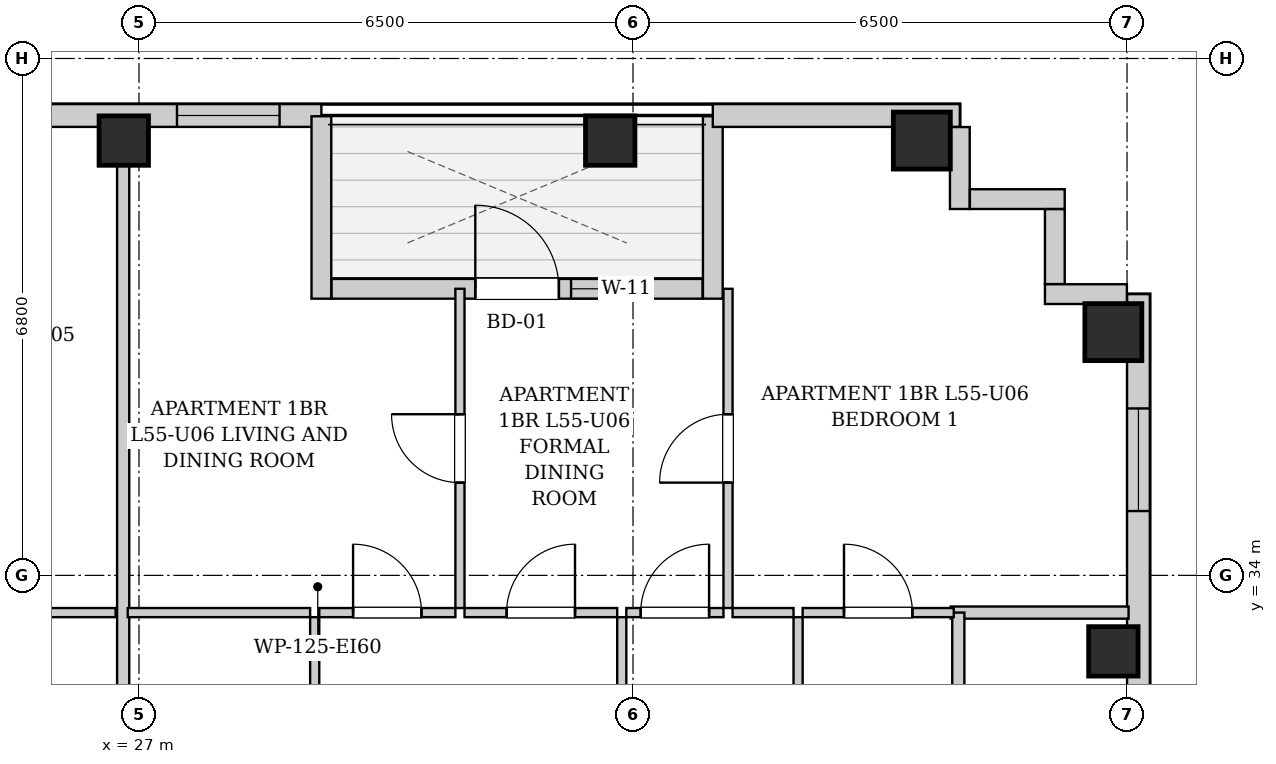
"""IFC4 building model, lengths in metres.
Left out: names, types, materials, properties, quantities, classifications, styles, units other than length and angle.
Written with IfcOpenShell. Run it as: python <this file> out.ifc"""

import sys

from ifc_helpers import new_model, si_unit, direction, frame, frame_2d, origin, origin_2d, place, context, subcontext, project, spatial, rectangle, extrude, element, fill, save


model = new_model("IFC4")
c1 = context("Model", 3, precision=1e-05, world=origin(), true_north=direction((0.0, 1.0)))
c2 = subcontext(c1, "Body", "Model", "MODEL_VIEW")
j1 = project(units=[si_unit("LENGTHUNIT", "METRE"), si_unit("PLANEANGLEUNIT", "RADIAN")], contexts=[c1])
p1 = place(None, origin())
s1 = spatial("IfcSite", under=j1, at=p1, CompositionType="ELEMENT")
p2 = place(p1, origin())
s2 = spatial("IfcBuilding", under=s1, at=p2, CompositionType="ELEMENT")
p3 = place(p2, frame((0.0, 0.0, 190.9)))
s3 = spatial("IfcBuildingStorey", under=s2, at=p3, CompositionType="ELEMENT", Elevation=190.9)
for number, where, z_axis, x_axis in (
    (1, (26.8, 39.72, 0.0), (0.0, 0.0, 1.0), (1.0, 0.0, 0.0)),
    (2, (33.2, 39.72, 0.0), (0.0, 0.0, 1.0), (1.0, 0.0, 0.0)),
):
    element("IfcColumn", number, at=place(p3, frame(where, z_axis=z_axis, x_axis=x_axis)), inside=s3, PredefinedType="COLUMN", context=c2, shape_type="SweptSolid", body=[
        extrude(rectangle(XDim=0.65, YDim=0.65, at=origin_2d()), origin(), (0.0, 0.0, 1.0), 3.3),
    ])
p4 = place(p3, frame((37.3, 39.72, 0.0), z_axis=(0.0, 0.0, 1.0), x_axis=(1.0, 0.0, 0.0)))
e3 = element("IfcColumn", 3, at=p4, inside=s3, PredefinedType="COLUMN", context=c2, shape_type="SweptSolid", body=[
    extrude(rectangle(XDim=0.75, YDim=0.75, at=origin_2d()), origin(), (0.0, 0.0, 1.0), 3.3),
])
p5 = place(p3, frame((39.82, 33.0, 0.0), z_axis=(0.0, 0.0, 1.0), x_axis=(1.0, 0.0, 0.0)))
e4 = element("IfcColumn", 4, at=p5, inside=s3, PredefinedType="COLUMN", context=c2, shape_type="SweptSolid", body=[
    extrude(rectangle(XDim=0.65, YDim=0.65, at=origin_2d()), origin(), (0.0, 0.0, 1.0), 3.3),
])
p6 = place(p3, frame((39.82, 37.2, 0.0), z_axis=(0.0, 0.0, 1.0), x_axis=(1.0, 0.0, 0.0)))
e5 = element("IfcColumn", 5, at=p6, inside=s3, PredefinedType="COLUMN", context=c2, shape_type="SweptSolid", body=[
    extrude(rectangle(XDim=0.75, YDim=0.75, at=origin_2d()), origin(), (0.0, 0.0, 1.0), 3.3),
])
p7 = place(p3, frame((19.7, 40.05, 0.0), z_axis=(0.0, 0.0, 1.0), x_axis=(1.0, 0.0, 0.0)))
e6 = element("IfcWall", 6, at=p7, inside=s3, PredefinedType="SOLIDWALL", context=c2, shape_type="SweptSolid", body=[
    extrude(rectangle(XDim=9.7, YDim=0.3, at=frame_2d((4.85, 0.0))), origin(), (0.0, 0.0, 1.0), 3.04),
])
p8 = place(p7, frame((2.12, 0.0, 0.55)))
e7 = element("IfcOpeningElement", 7, at=p8, cuts=e6, PredefinedType="OPENING", context=c2, shape_type="SweptSolid", body=[
    extrude(rectangle(XDim=0.68, YDim=1.2, at=frame_2d((0.34, 0.6))), frame((0.0, 0.16, 0.0), z_axis=(0.0, -1.0, 0.0), x_axis=(1.0, 0.0, 0.0)), (0.0, 0.0, 1.0), 0.32),
])
p9 = place(p7, frame((7.8, 0.0, 0.55)))
e8 = element("IfcOpeningElement", 8, at=p9, cuts=e6, PredefinedType="OPENING", context=c2, shape_type="SweptSolid", body=[
    extrude(rectangle(XDim=1.35, YDim=1.2, at=frame_2d((0.675, 0.6))), frame((0.0, 0.16, 0.0), z_axis=(0.0, -1.0, 0.0), x_axis=(1.0, 0.0, 0.0)), (0.0, 0.0, 1.0), 0.32),
])
p10 = place(p3, frame((29.4, 40.04, 0.0), z_axis=(0.0, 0.0, 1.0), x_axis=(0.0, -1.0, 0.0)))
e9 = element("IfcWall", 9, at=p10, inside=s3, PredefinedType="SOLIDWALL", context=c2, shape_type="SweptSolid", body=[
    extrude(rectangle(XDim=2.4, YDim=0.26, at=frame_2d((1.2, 0.0))), origin(), (0.0, 0.0, 1.0), 3.04),
])
p11 = place(p3, frame((29.534, 37.77, 0.0), z_axis=(0.0, 0.0, 1.0), x_axis=(1.0, 0.0, 0.0)))
e10 = element("IfcWall", 10, at=p11, inside=s3, PredefinedType="SOLIDWALL", context=c2, shape_type="SweptSolid", body=[
    extrude(rectangle(XDim=4.882, YDim=0.26, at=frame_2d((2.441, 0.0))), origin(), (0.0, 0.0, 1.0), 3.04),
])
p12 = place(p11, frame((1.891, 0.0, 0.0)))
e11 = element("IfcOpeningElement", 11, at=p12, cuts=e10, PredefinedType="OPENING", context=c2, shape_type="SweptSolid", body=[
    extrude(rectangle(XDim=1.1, YDim=2.0, at=frame_2d((0.55, 1.0))), frame((0.0, 0.14, 0.0), z_axis=(0.0, -1.0, 0.0), x_axis=(1.0, 0.0, 0.0)), (0.0, 0.0, 1.0), 0.28),
])
p13 = place(p11, frame((3.151, 0.0, 0.55)))
e12 = element("IfcOpeningElement", 12, at=p13, cuts=e10, PredefinedType="OPENING", context=c2, shape_type="SweptSolid", body=[
    extrude(rectangle(XDim=0.85, YDim=1.2, at=frame_2d((0.425, 0.6))), frame((0.0, 0.14, 0.0), z_axis=(0.0, -1.0, 0.0), x_axis=(1.0, 0.0, 0.0)), (0.0, 0.0, 1.0), 0.28),
])
p14 = place(p3, frame((34.55, 37.64, 0.0), z_axis=(0.0, 0.0, 1.0), x_axis=(0.0, 1.0, 0.0)))
e13 = element("IfcWall", 13, at=p14, inside=s3, PredefinedType="SOLIDWALL", context=c2, shape_type="SweptSolid", body=[
    extrude(rectangle(XDim=2.4, YDim=0.26, at=frame_2d((1.2, 0.0))), origin(), (0.0, 0.0, 1.0), 3.04),
])
p15 = place(p3, frame((34.55, 40.05, 0.0), z_axis=(0.0, 0.0, 1.0), x_axis=(1.0, 0.0, 0.0)))
e14 = element("IfcWall", 14, at=p15, inside=s3, PredefinedType="SOLIDWALL", context=c2, shape_type="SweptSolid", body=[
    extrude(rectangle(XDim=3.25, YDim=0.3, at=frame_2d((1.625, 0.0))), origin(), (0.0, 0.0, 1.0), 3.04),
])
p16 = place(p3, frame((40.15, 37.7, 0.0), z_axis=(0.0, 0.0, 1.0), x_axis=(0.0, -1.0, 0.0)))
e15 = element("IfcWall", 15, at=p16, inside=s3, PredefinedType="SOLIDWALL", context=c2, shape_type="SweptSolid", body=[
    extrude(rectangle(XDim=31.4, YDim=0.3, at=frame_2d((15.7, 0.0))), origin(), (0.0, 0.0, 1.0), 3.04),
])
p17 = place(p16, frame((1.504, 0.0, 0.55)))
e16 = element("IfcOpeningElement", 16, at=p17, cuts=e15, PredefinedType="OPENING", context=c2, shape_type="SweptSolid", body=[
    extrude(rectangle(XDim=1.35, YDim=1.2, at=frame_2d((0.675, 0.6))), frame((0.0, 0.16, 0.0), z_axis=(0.0, -1.0, 0.0), x_axis=(1.0, 0.0, 0.0)), (0.0, 0.0, 1.0), 0.32),
])
p18 = place(p16, frame((18.2, 0.0, 0.55)))
e17 = element("IfcOpeningElement", 17, at=p18, cuts=e15, PredefinedType="OPENING", context=c2, shape_type="SweptSolid", body=[
    extrude(rectangle(XDim=1.35, YDim=1.2, at=frame_2d((0.675, 0.6))), frame((0.0, 0.16, 0.0), z_axis=(0.0, -1.0, 0.0), x_axis=(1.0, 0.0, 0.0)), (0.0, 0.0, 1.0), 0.32),
])
p19 = place(p16, frame((19.81, 0.0, 0.55)))
e18 = element("IfcOpeningElement", 18, at=p19, cuts=e15, PredefinedType="OPENING", context=c2, shape_type="SweptSolid", body=[
    extrude(rectangle(XDim=1.35, YDim=1.2, at=frame_2d((0.675, 0.6))), frame((0.0, 0.16, 0.0), z_axis=(0.0, -1.0, 0.0), x_axis=(1.0, 0.0, 0.0)), (0.0, 0.0, 1.0), 0.32),
])
p20 = place(p16, frame((11.043, 0.0, 0.55)))
e19 = element("IfcOpeningElement", 19, at=p20, cuts=e15, PredefinedType="OPENING", context=c2, shape_type="SweptSolid", body=[
    extrude(rectangle(XDim=1.35, YDim=1.2, at=frame_2d((0.675, 0.6))), frame((0.0, 0.16, 0.0), z_axis=(0.0, -1.0, 0.0), x_axis=(1.0, 0.0, 0.0)), (0.0, 0.0, 1.0), 0.32),
])
p21 = place(p16, frame((9.185, 0.0, 0.55)))
e20 = element("IfcOpeningElement", 20, at=p21, cuts=e15, PredefinedType="OPENING", context=c2, shape_type="SweptSolid", body=[
    extrude(rectangle(XDim=1.35, YDim=1.2, at=frame_2d((0.675, 0.6))), frame((0.0, 0.16, 0.0), z_axis=(0.0, -1.0, 0.0), x_axis=(1.0, 0.0, 0.0)), (0.0, 0.0, 1.0), 0.32),
])
p22 = place(p3, frame((37.8, 39.898, 0.0), z_axis=(0.0, 0.0, 1.0), x_axis=(0.0, -1.0, 0.0)))
e21 = element("IfcWall", 21, at=p22, inside=s3, PredefinedType="SOLIDWALL", context=c2, shape_type="SweptSolid", body=[
    extrude(rectangle(XDim=1.078, YDim=0.26, at=frame_2d((0.539, 0.0))), origin(), (0.0, 0.0, 1.0), 3.04),
])
p23 = place(p3, frame((37.932, 38.95, 0.0), z_axis=(0.0, 0.0, 1.0), x_axis=(1.0, 0.0, 0.0)))
e22 = element("IfcWall", 22, at=p23, inside=s3, PredefinedType="SOLIDWALL", context=c2, shape_type="SweptSolid", body=[
    extrude(rectangle(XDim=1.248, YDim=0.26, at=frame_2d((0.624, 0.0))), origin(), (0.0, 0.0, 1.0), 3.04),
])
p24 = place(p3, frame((39.05, 38.818, 0.0), z_axis=(0.0, 0.0, 1.0), x_axis=(0.0, -1.0, 0.0)))
e23 = element("IfcWall", 23, at=p24, inside=s3, PredefinedType="SOLIDWALL", context=c2, shape_type="SweptSolid", body=[
    extrude(rectangle(XDim=0.986, YDim=0.26, at=frame_2d((0.493, 0.0))), origin(), (0.0, 0.0, 1.0), 3.04),
])
p25 = place(p3, frame((38.92, 37.7, 0.0), z_axis=(0.0, 0.0, 1.0), x_axis=(1.0, 0.0, 0.0)))
e24 = element("IfcWall", 24, at=p25, inside=s3, PredefinedType="SOLIDWALL", context=c2, shape_type="SweptSolid", body=[
    extrude(rectangle(XDim=1.078, YDim=0.26, at=frame_2d((0.539, 0.0))), origin(), (0.0, 0.0, 1.0), 3.04),
])
p26 = place(p3, frame((23.535, 33.51, 0.0), z_axis=(0.0, 0.0, 1.0), x_axis=(1.0, 0.0, 0.0)))
e25 = element("IfcWall", 25, at=p26, inside=s3, PredefinedType="PARTITIONING", context=c2, shape_type="SweptSolid", body=[
    extrude(rectangle(XDim=3.157, YDim=0.12, at=frame_2d((1.579, 0.0))), origin(), (0.0, 0.0, 1.0), 3.04),
])
p27 = place(p26, frame((1.129, 0.0, 0.0)))
e26 = element("IfcOpeningElement", 26, at=p27, cuts=e25, PredefinedType="OPENING", context=c2, shape_type="SweptSolid", body=[
    extrude(rectangle(XDim=0.9, YDim=2.05, at=frame_2d((0.45, 1.025))), frame((0.0, 0.07, 0.0), z_axis=(0.0, -1.0, 0.0), x_axis=(1.0, 0.0, 0.0)), (0.0, 0.0, 1.0), 0.14),
])
p28 = place(p3, frame((37.68, 33.51, 0.0), z_axis=(0.0, 0.0, 1.0), x_axis=(1.0, 0.0, 0.0)))
e27 = element("IfcWall", 27, at=p28, inside=s3, PredefinedType="PARTITIONING", context=c2, shape_type="SweptSolid", body=[
    extrude(rectangle(XDim=2.34, YDim=0.16, at=frame_2d((1.17, 0.0))), origin(), (0.0, 0.0, 1.0), 3.04),
])
p29 = place(p3, frame((37.78, 30.6, 0.0), z_axis=(0.0, 0.0, 1.0), x_axis=(0.0, 1.0, 0.0)))
e28 = element("IfcWall", 28, at=p29, inside=s3, PredefinedType="PARTITIONING", context=c2, shape_type="SweptSolid", body=[
    extrude(rectangle(XDim=2.91, YDim=0.16, at=frame_2d((1.455, 0.0))), origin(), (0.0, 0.0, 1.0), 3.04),
])
p30 = place(p3, frame((26.792, 30.6, 0.0), z_axis=(0.0, 0.0, 1.0), x_axis=(0.0, 1.0, 0.0)))
e29 = element("IfcWall", 29, at=p30, inside=s3, PredefinedType="PARTITIONING", context=c2, shape_type="SweptSolid", body=[
    extrude(rectangle(XDim=9.32, YDim=0.16, at=frame_2d((4.66, 0.0))), origin(), (0.0, 0.0, 1.0), 3.04),
])
p31 = place(p3, frame((29.312, 30.6, 0.0), z_axis=(0.0, 0.0, 1.0), x_axis=(0.0, 1.0, 0.0)))
e30 = element("IfcWall", 30, at=p31, inside=s3, PredefinedType="PARTITIONING", context=c2, shape_type="SweptSolid", body=[
    extrude(rectangle(XDim=2.85, YDim=0.12, at=frame_2d((1.425, 0.0))), origin(), (0.0, 0.0, 1.0), 3.04),
])
p32 = place(p31, frame((0.995, 0.0, 0.0)))
e31 = element("IfcOpeningElement", 31, at=p32, cuts=e30, PredefinedType="OPENING", context=c2, shape_type="SweptSolid", body=[
    extrude(rectangle(XDim=0.86, YDim=2.05, at=frame_2d((0.43, 1.025))), frame((0.0, 0.07, 0.0), z_axis=(0.0, -1.0, 0.0), x_axis=(1.0, 0.0, 0.0)), (0.0, 0.0, 1.0), 0.14),
])
p33 = place(p3, frame((26.852, 33.51, 0.0), z_axis=(0.0, 0.0, 1.0), x_axis=(1.0, 0.0, 0.0)))
e32 = element("IfcWall", 32, at=p33, inside=s3, PredefinedType="PARTITIONING", context=c2, shape_type="SweptSolid", body=[
    extrude(rectangle(XDim=2.4, YDim=0.12, at=frame_2d((1.2, 0.0))), origin(), (0.0, 0.0, 1.0), 3.04),
])
p34 = place(p3, frame((33.352, 30.6, 0.0), z_axis=(0.0, 0.0, 1.0), x_axis=(0.0, 1.0, 0.0)))
e33 = element("IfcWall", 33, at=p34, inside=s3, PredefinedType="PARTITIONING", context=c2, shape_type="SweptSolid", body=[
    extrude(rectangle(XDim=2.85, YDim=0.12, at=frame_2d((1.425, 0.0))), origin(), (0.0, 0.0, 1.0), 3.04),
])
p35 = place(p34, frame((0.975, 0.0, 0.0)))
e34 = element("IfcOpeningElement", 34, at=p35, cuts=e33, PredefinedType="OPENING", context=c2, shape_type="SweptSolid", body=[
    extrude(rectangle(XDim=0.9, YDim=2.05, at=frame_2d((0.45, 1.025))), frame((0.0, 0.07, 0.0), z_axis=(0.0, -1.0, 0.0), x_axis=(1.0, 0.0, 0.0)), (0.0, 0.0, 1.0), 0.14),
])
p36 = place(p3, frame((29.372, 33.51, 0.0), z_axis=(0.0, 0.0, 1.0), x_axis=(1.0, 0.0, 0.0)))
e35 = element("IfcWall", 35, at=p36, inside=s3, PredefinedType="PARTITIONING", context=c2, shape_type="SweptSolid", body=[
    extrude(rectangle(XDim=1.791, YDim=0.12, at=frame_2d((0.896, 0.0))), origin(), (0.0, 0.0, 1.0), 3.04),
])
p37 = place(p36, frame((0.445, 0.0, 0.0)))
e36 = element("IfcOpeningElement", 36, at=p37, cuts=e35, PredefinedType="OPENING", context=c2, shape_type="SweptSolid", body=[
    extrude(rectangle(XDim=0.9, YDim=2.05, at=frame_2d((0.45, 1.025))), frame((0.0, 0.07, 0.0), z_axis=(0.0, -1.0, 0.0), x_axis=(1.0, 0.0, 0.0)), (0.0, 0.0, 1.0), 0.14),
])
p38 = place(p3, frame((31.283, 33.51, 0.0), z_axis=(0.0, 0.0, 1.0), x_axis=(1.0, 0.0, 0.0)))
e37 = element("IfcWall", 37, at=p38, inside=s3, PredefinedType="PARTITIONING", context=c2, shape_type="SweptSolid", body=[
    extrude(rectangle(XDim=2.009, YDim=0.12, at=frame_2d((1.004, 0.0))), origin(), (0.0, 0.0, 1.0), 3.04),
])
p39 = place(p38, frame((0.554, 0.0, 0.0)))
e38 = element("IfcOpeningElement", 38, at=p39, cuts=e37, PredefinedType="OPENING", context=c2, shape_type="SweptSolid", body=[
    extrude(rectangle(XDim=0.9, YDim=2.05, at=frame_2d((0.45, 1.025))), frame((0.0, 0.07, 0.0), z_axis=(0.0, -1.0, 0.0), x_axis=(1.0, 0.0, 0.0)), (0.0, 0.0, 1.0), 0.14),
])
p40 = place(p3, frame((35.672, 30.6, 0.0), z_axis=(0.0, 0.0, 1.0), x_axis=(0.0, 1.0, 0.0)))
e39 = element("IfcWall", 39, at=p40, inside=s3, PredefinedType="PARTITIONING", context=c2, shape_type="SweptSolid", body=[
    extrude(rectangle(XDim=2.85, YDim=0.12, at=frame_2d((1.425, 0.0))), origin(), (0.0, 0.0, 1.0), 3.04),
])
p41 = place(p40, frame((0.975, 0.0, 0.0)))
e40 = element("IfcOpeningElement", 40, at=p41, cuts=e39, PredefinedType="OPENING", context=c2, shape_type="SweptSolid", body=[
    extrude(rectangle(XDim=0.9, YDim=2.05, at=frame_2d((0.45, 1.025))), frame((0.0, 0.07, 0.0), z_axis=(0.0, -1.0, 0.0), x_axis=(1.0, 0.0, 0.0)), (0.0, 0.0, 1.0), 0.14),
])
p42 = place(p3, frame((33.412, 33.51, 0.0), z_axis=(0.0, 0.0, 1.0), x_axis=(1.0, 0.0, 0.0)))
e41 = element("IfcWall", 41, at=p42, inside=s3, PredefinedType="PARTITIONING", context=c2, shape_type="SweptSolid", body=[
    extrude(rectangle(XDim=1.278, YDim=0.12, at=frame_2d((0.639, 0.0))), origin(), (0.0, 0.0, 1.0), 3.04),
])
p43 = place(p42, frame((0.189, 0.0, 0.0)))
e42 = element("IfcOpeningElement", 42, at=p43, cuts=e41, PredefinedType="OPENING", context=c2, shape_type="SweptSolid", body=[
    extrude(rectangle(XDim=0.9, YDim=2.05, at=frame_2d((0.45, 1.025))), frame((0.0, 0.07, 0.0), z_axis=(0.0, -1.0, 0.0), x_axis=(1.0, 0.0, 0.0)), (0.0, 0.0, 1.0), 0.14),
])
p44 = place(p3, frame((34.81, 33.51, 0.0), z_axis=(0.0, 0.0, 1.0), x_axis=(1.0, 0.0, 0.0)))
e43 = element("IfcWall", 43, at=p44, inside=s3, PredefinedType="PARTITIONING", context=c2, shape_type="SweptSolid", body=[
    extrude(rectangle(XDim=0.802, YDim=0.12, at=frame_2d((0.401, 0.0))), origin(), (0.0, 0.0, 1.0), 3.04),
])
p45 = place(p3, frame((35.732, 33.51, 0.0), z_axis=(0.0, 0.0, 1.0), x_axis=(1.0, 0.0, 0.0)))
e44 = element("IfcWall", 44, at=p45, inside=s3, PredefinedType="PARTITIONING", context=c2, shape_type="SweptSolid", body=[
    extrude(rectangle(XDim=1.988, YDim=0.12, at=frame_2d((0.994, 0.0))), origin(), (0.0, 0.0, 1.0), 3.04),
])
p46 = place(p45, frame((0.544, 0.0, 0.0)))
e45 = element("IfcOpeningElement", 45, at=p46, cuts=e44, PredefinedType="OPENING", context=c2, shape_type="SweptSolid", body=[
    extrude(rectangle(XDim=0.9, YDim=2.05, at=frame_2d((0.45, 1.025))), frame((0.0, 0.07, 0.0), z_axis=(0.0, -1.0, 0.0), x_axis=(1.0, 0.0, 0.0)), (0.0, 0.0, 1.0), 0.14),
])
p47 = place(p3, frame((31.223, 33.57, 0.0), z_axis=(0.0, 0.0, 1.0), x_axis=(0.0, 1.0, 0.0)))
e46 = element("IfcWall", 46, at=p47, inside=s3, PredefinedType="PARTITIONING", context=c2, shape_type="SweptSolid", body=[
    extrude(rectangle(XDim=4.2, YDim=0.12, at=frame_2d((2.1, 0.0))), origin(), (0.0, 0.0, 1.0), 3.04),
])
p48 = place(p47, frame((1.65, 0.0, 0.0)))
e47 = element("IfcOpeningElement", 47, at=p48, cuts=e46, PredefinedType="OPENING", context=c2, shape_type="SweptSolid", body=[
    extrude(rectangle(XDim=0.9, YDim=2.05, at=frame_2d((0.45, 1.025))), frame((0.0, 0.07, 0.0), z_axis=(0.0, -1.0, 0.0), x_axis=(1.0, 0.0, 0.0)), (0.0, 0.0, 1.0), 0.14),
])
p49 = place(p3, frame((34.75, 33.57, 0.0), z_axis=(0.0, 0.0, 1.0), x_axis=(0.0, 1.0, 0.0)))
e48 = element("IfcWall", 48, at=p49, inside=s3, PredefinedType="PARTITIONING", context=c2, shape_type="SweptSolid", body=[
    extrude(rectangle(XDim=4.2, YDim=0.12, at=frame_2d((2.1, 0.0))), origin(), (0.0, 0.0, 1.0), 3.04),
])
p50 = place(p49, frame((1.65, 0.0, 0.0)))
e49 = element("IfcOpeningElement", 49, at=p50, cuts=e48, PredefinedType="OPENING", context=c2, shape_type="SweptSolid", body=[
    extrude(rectangle(XDim=0.9, YDim=2.05, at=frame_2d((0.45, 1.025))), frame((0.0, 0.07, 0.0), z_axis=(0.0, -1.0, 0.0), x_axis=(1.0, 0.0, 0.0)), (0.0, 0.0, 1.0), 0.14),
])
p51 = place(p37, origin())
e50 = element("IfcDoor", 50, at=p51, inside=s3, OperationType="SINGLE_SWING_LEFT", PredefinedType="DOOR", context=c2, shape_type="SweptSolid", body=[
    extrude(rectangle(XDim=0.9, YDim=2.05, at=frame_2d((0.45, 1.025))), frame((0.0, 0.025, 0.0), z_axis=(0.0, -1.0, 0.0), x_axis=(1.0, 0.0, 0.0)), (0.0, 0.0, 1.0), 0.05),
])
fill(e36, e50)
p52 = place(p39, origin())
e51 = element("IfcDoor", 51, at=p52, inside=s3, OperationType="SINGLE_SWING_RIGHT", PredefinedType="DOOR", context=c2, shape_type="SweptSolid", body=[
    extrude(rectangle(XDim=0.9, YDim=2.05, at=frame_2d((0.45, 1.025))), frame((0.0, 0.025, 0.0), z_axis=(0.0, -1.0, 0.0), x_axis=(1.0, 0.0, 0.0)), (0.0, 0.0, 1.0), 0.05),
])
fill(e38, e51)
p53 = place(p43, origin())
e52 = element("IfcDoor", 52, at=p53, inside=s3, OperationType="SINGLE_SWING_RIGHT", PredefinedType="DOOR", context=c2, shape_type="SweptSolid", body=[
    extrude(rectangle(XDim=0.9, YDim=2.05, at=frame_2d((0.45, 1.025))), frame((0.0, 0.025, 0.0), z_axis=(0.0, -1.0, 0.0), x_axis=(1.0, 0.0, 0.0)), (0.0, 0.0, 1.0), 0.05),
])
fill(e42, e52)
p54 = place(p46, origin())
e53 = element("IfcDoor", 53, at=p54, inside=s3, OperationType="SINGLE_SWING_LEFT", PredefinedType="DOOR", context=c2, shape_type="SweptSolid", body=[
    extrude(rectangle(XDim=0.9, YDim=2.05, at=frame_2d((0.45, 1.025))), frame((0.0, 0.025, 0.0), z_axis=(0.0, -1.0, 0.0), x_axis=(1.0, 0.0, 0.0)), (0.0, 0.0, 1.0), 0.05),
])
fill(e45, e53)
p55 = place(p48, origin())
e54 = element("IfcDoor", 54, at=p55, inside=s3, OperationType="SINGLE_SWING_RIGHT", PredefinedType="DOOR", context=c2, shape_type="SweptSolid", body=[
    extrude(rectangle(XDim=0.9, YDim=2.05, at=frame_2d((0.45, 1.025))), frame((0.0, 0.025, 0.0), z_axis=(0.0, -1.0, 0.0), x_axis=(1.0, 0.0, 0.0)), (0.0, 0.0, 1.0), 0.05),
])
fill(e47, e54)
p56 = place(p50, origin())
e55 = element("IfcDoor", 55, at=p56, inside=s3, OperationType="SINGLE_SWING_LEFT", PredefinedType="DOOR", context=c2, shape_type="SweptSolid", body=[
    extrude(rectangle(XDim=0.9, YDim=2.05, at=frame_2d((0.45, 1.025))), frame((0.0, 0.025, 0.0), z_axis=(0.0, -1.0, 0.0), x_axis=(1.0, 0.0, 0.0)), (0.0, 0.0, 1.0), 0.05),
])
fill(e49, e55)
p57 = place(p12, origin())
e56 = element("IfcDoor", 56, at=p57, inside=s3, OperationType="SINGLE_SWING_LEFT", PredefinedType="DOOR", context=c2, shape_type="SweptSolid", body=[
    extrude(rectangle(XDim=1.1, YDim=2.0, at=frame_2d((0.55, 1.0))), frame((0.0, 0.025, 0.0), z_axis=(0.0, -1.0, 0.0), x_axis=(1.0, 0.0, 0.0)), (0.0, 0.0, 1.0), 0.05),
])
fill(e11, e56)
p58 = place(p9, origin())
e57 = element("IfcWindow", 57, at=p58, inside=s3, PartitioningType="SINGLE_PANEL", PredefinedType="WINDOW", context=c2, shape_type="SweptSolid", body=[
    extrude(rectangle(XDim=1.35, YDim=1.2, at=frame_2d((0.675, 0.6))), frame((0.0, 0.03, 0.0), z_axis=(0.0, -1.0, 0.0), x_axis=(1.0, 0.0, 0.0)), (0.0, 0.0, 1.0), 0.06),
])
fill(e8, e57)
p59 = place(p13, origin())
e58 = element("IfcWindow", 58, at=p59, inside=s3, PartitioningType="SINGLE_PANEL", PredefinedType="WINDOW", context=c2, shape_type="SweptSolid", body=[
    extrude(rectangle(XDim=0.85, YDim=1.2, at=frame_2d((0.425, 0.6))), frame((0.0, 0.03, 0.0), z_axis=(0.0, -1.0, 0.0), x_axis=(1.0, 0.0, 0.0)), (0.0, 0.0, 1.0), 0.06),
])
fill(e12, e58)
p60 = place(p17, origin())
e59 = element("IfcWindow", 59, at=p60, inside=s3, PartitioningType="SINGLE_PANEL", PredefinedType="WINDOW", context=c2, shape_type="SweptSolid", body=[
    extrude(rectangle(XDim=1.35, YDim=1.2, at=frame_2d((0.675, 0.6))), frame((0.0, 0.03, 0.0), z_axis=(0.0, -1.0, 0.0), x_axis=(1.0, 0.0, 0.0)), (0.0, 0.0, 1.0), 0.06),
])
fill(e16, e59)
save(model, sys.argv[1])
